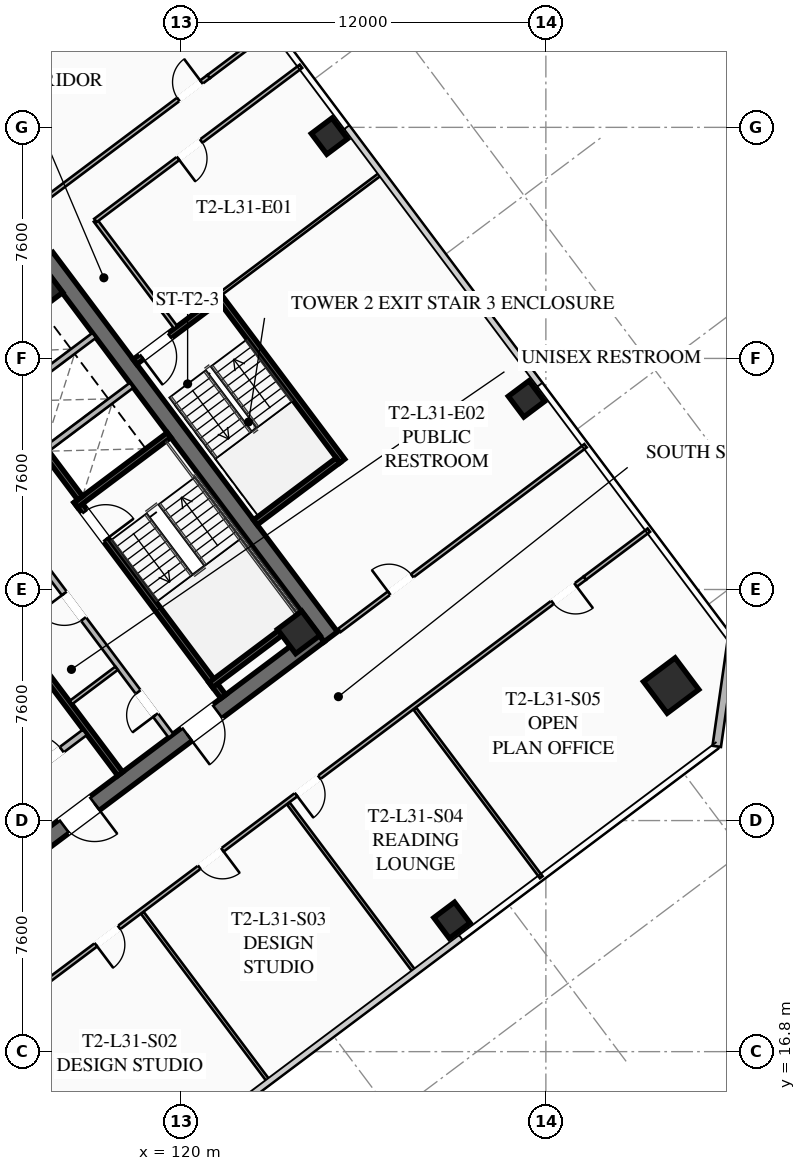
"""IFC4 building model, lengths in metres.
Left out: names, types, materials, properties, quantities, classifications, styles, units other than length and angle.
Written with IfcOpenShell. Run it as: python <this file> out.ifc"""

import sys

from ifc_helpers import new_model, si_unit, direction, frame, frame_2d, origin, origin_2d, place, context, subcontext, project, spatial, rectangle, hollow_rectangle, extrude, element, fill, save


model = new_model("IFC4")
c1 = context("Model", 3, precision=1e-05, world=origin(), true_north=direction((0.0, 1.0)))
c2 = subcontext(c1, "Body", "Model", "MODEL_VIEW")
j1 = project(units=[si_unit("LENGTHUNIT", "METRE"), si_unit("PLANEANGLEUNIT", "RADIAN")], contexts=[c1])
p1 = place(None, origin())
s1 = spatial("IfcSite", under=j1, at=p1, CompositionType="ELEMENT")
p2 = place(p1, origin())
s2 = spatial("IfcBuilding", under=s1, at=p2, CompositionType="ELEMENT")
p3 = place(p2, frame((0.0, 0.0, 117.95)))
s3 = spatial("IfcBuildingStorey", under=s2, at=p3, CompositionType="ELEMENT", Elevation=117.95)
p4 = place(p3, frame((115.564, 42.923, 0.0), z_axis=(0.0, 0.0, 1.0), x_axis=(0.600005007985, -0.799996243986, 0.0)))
e1 = element("IfcWall", 1, at=p4, inside=s3, PredefinedType="SHEAR", context=c2, shape_type="SweptSolid", body=[
    extrude(rectangle(XDim=15.6, YDim=0.55, at=frame_2d((7.8, 0.0))), origin(), (0.0, 0.0, 1.0), 3.55),
])
p5 = place(p3, frame((124.539, 30.498, 0.0), z_axis=(0.0, 0.0, 1.0), x_axis=(-0.799998054672, -0.600002593761, 0.0)))
e2 = element("IfcWall", 2, at=p5, inside=s3, PredefinedType="SHEAR", context=c2, shape_type="SweptSolid", body=[
    extrude(rectangle(XDim=15.06, YDim=0.55, at=frame_2d((7.53, 0.0))), origin(), (0.0, 0.0, 1.0), 3.55),
])
p6 = place(p5, frame((9.23, 0.0, 0.0)))
e3 = element("IfcOpeningElement", 3, at=p6, cuts=e2, PredefinedType="OPENING", context=c2, shape_type="SweptSolid", body=[
    extrude(rectangle(XDim=1.25, YDim=2.25, at=frame_2d((0.625, 1.125))), frame((0.0, 0.285, 0.0), z_axis=(0.0, -1.0, 0.0), x_axis=(1.0, 0.0, 0.0)), (0.0, 0.0, 1.0), 0.57),
])
p7 = place(p5, frame((4.18, 0.0, 0.0)))
e4 = element("IfcOpeningElement", 4, at=p7, cuts=e2, PredefinedType="OPENING", context=c2, shape_type="SweptSolid", body=[
    extrude(rectangle(XDim=1.25, YDim=2.25, at=frame_2d((0.625, 1.125))), frame((0.0, 0.285, 0.0), z_axis=(0.0, -1.0, 0.0), x_axis=(1.0, 0.0, 0.0)), (0.0, 0.0, 1.0), 0.57),
])
for number, where, z_axis, x_axis in (
    (5, (123.87, 30.59, 0.0), (0.0, 0.0, 1.0), (0.8, 0.6, 0.0)),
    (6, (115.41, 41.87, 0.0), (0.0, 0.0, 1.0), (0.8, 0.6, 0.0)),
):
    element("IfcColumn", number, at=place(p3, frame(where, z_axis=z_axis, x_axis=x_axis)), inside=s3, PredefinedType="COLUMN", context=c2, shape_type="SweptSolid", body=[
        extrude(hollow_rectangle(XDim=1.0, YDim=1.0, WallThickness=0.04, at=origin_2d()), origin(), (0.0, 0.0, 1.0), 3.37),
    ])
p8 = place(p3, frame((136.12, 28.84, 0.0), z_axis=(0.0, 0.0, 1.0), x_axis=(0.799999996291, 0.600000004945, 0.0)))
e7 = element("IfcColumn", 7, at=p8, inside=s3, PredefinedType="COLUMN", context=c2, shape_type="SweptSolid", body=[
    extrude(hollow_rectangle(XDim=1.3, YDim=1.3, WallThickness=0.05, at=origin_2d()), origin(), (0.0, 0.0, 1.0), 3.37),
])
for number, where, z_axis, x_axis in (
    (8, (128.91, 21.12, 0.0), (0.0, 0.0, 1.0), (0.8, 0.6, 0.0)),
    (9, (131.36, 38.27, 0.0), (0.0, 0.0, 1.0), (0.8, 0.6, 0.0)),
    (10, (124.88, 46.91, 0.0), (0.0, 0.0, 1.0), (0.8, 0.6, 0.0)),
):
    element("IfcColumn", number, at=place(p3, frame(where, z_axis=z_axis, x_axis=x_axis)), inside=s3, PredefinedType="COLUMN", context=c2, shape_type="SweptSolid", body=[
        extrude(hollow_rectangle(XDim=0.85, YDim=0.85, WallThickness=0.035, at=origin_2d()), origin(), (0.0, 0.0, 1.0), 3.37),
    ])
p9 = place(p3, frame((138.12, 30.34, 0.0), z_axis=(0.0, 0.0, 1.0), x_axis=(-0.141421356237, -0.989949493661, 0.0)))
e11 = element("IfcWall", 11, at=p9, inside=s3, PredefinedType="SOLIDWALL", context=c2, shape_type="SweptSolid", body=[
    extrude(rectangle(XDim=3.536, YDim=0.28, at=frame_2d((1.768, 0.0))), origin(), (0.0, 0.0, 1.0), 3.37),
])
p10 = place(p3, frame((116.56, 34.92, 0.0), z_axis=(0.0, 0.0, 1.0), x_axis=(0.59999029481, -0.8000072788, 0.0)))
e12 = element("IfcWall", 12, at=p10, inside=s3, PredefinedType="SHEAR", context=c2, shape_type="SweptSolid", body=[
    extrude(rectangle(XDim=8.05, YDim=0.2, at=frame_2d((4.025, 0.0))), origin(), (0.0, 0.0, 1.0), 3.37),
])
p11 = place(p10, frame((0.45, 0.0, 0.0)))
e13 = element("IfcOpeningElement", 13, at=p11, cuts=e12, PredefinedType="OPENING", context=c2, shape_type="SweptSolid", body=[
    extrude(rectangle(XDim=1.15, YDim=2.2, at=frame_2d((0.575, 1.1))), frame((0.0, 0.11, 0.0), z_axis=(0.0, -1.0, 0.0), x_axis=(1.0, 0.0, 0.0)), (0.0, 0.0, 1.0), 0.22),
])
for number, where, z_axis, x_axis in (
    (14, (116.54, 34.78, 0.0), (0.0, 0.0, 1.0), (0.8, 0.6, 0.0)),
    (15, (120.98, 28.86, 0.0), (0.0, 0.0, 1.0), (0.8, 0.6, 0.0)),
):
    element("IfcWall", number, at=place(p3, frame(where, z_axis=z_axis, x_axis=x_axis)), inside=s3, PredefinedType="SHEAR", context=c2, shape_type="SweptSolid", body=[
        extrude(rectangle(XDim=3.83, YDim=0.2, at=frame_2d((1.915, 0.0))), origin(), (0.0, 0.0, 1.0), 3.37),
    ])
p12 = place(p3, frame((117.998, 25.936, 0.0), z_axis=(0.0, 0.0, 1.0), x_axis=(-0.600002693989, 0.799997979501, 0.0)))
e16 = element("IfcWall", 16, at=p12, inside=s3, PredefinedType="SHEAR", context=c2, shape_type="SweptSolid", body=[
    extrude(rectangle(XDim=14.5, YDim=0.2, at=frame_2d((7.25, 0.0))), origin(), (0.0, 0.0, 1.0), 3.37),
])
p13 = place(p3, frame((114.316, 25.412, 0.0), z_axis=(0.0, 0.0, 1.0), x_axis=(0.800018601094, 0.59997519774, 0.0)))
e17 = element("IfcWall", 17, at=p13, inside=s3, PredefinedType="SOLIDWALL", context=c2, shape_type="SweptSolid", body=[
    extrude(rectangle(XDim=3.15, YDim=0.22, at=frame_2d((1.575, 0.0))), origin(), (0.0, 0.0, 1.0), 2.723),
])
p14 = place(p13, frame((0.95, 0.0, 0.0)))
e18 = element("IfcOpeningElement", 18, at=p14, cuts=e17, PredefinedType="OPENING", context=c2, shape_type="SweptSolid", body=[
    extrude(rectangle(XDim=1.25, YDim=2.25, at=frame_2d((0.625, 1.125))), frame((0.0, 0.12, 0.0), z_axis=(0.0, -1.0, 0.0), x_axis=(1.0, 0.0, 0.0)), (0.0, 0.0, 1.0), 0.24),
])
p15 = place(p3, frame((112.81, 40.17, 0.0), z_axis=(0.0, 0.0, 1.0), x_axis=(0.599993943644, -0.800004542231, 0.0)))
e19 = element("IfcWall", 19, at=p15, inside=s3, PredefinedType="SHEAR", context=c2, shape_type="SweptSolid", body=[
    extrude(rectangle(XDim=6.45, YDim=0.2, at=frame_2d((3.225, 0.0))), origin(), (0.0, 0.0, 1.0), 3.37),
])
for number, where, z_axis, x_axis in (
    (20, (115.59, 36.63, 0.0), (0.0, 0.0, 1.0), (0.8, 0.6, 0.0)),
    (21, (114.36, 38.27, 0.0), (0.0, 0.0, 1.0), (0.8, 0.6, 0.0)),
):
    element("IfcWall", number, at=place(p3, frame(where, z_axis=z_axis, x_axis=x_axis)), inside=s3, PredefinedType="SOLIDWALL", context=c2, shape_type="SweptSolid", body=[
        extrude(rectangle(XDim=3.48, YDim=0.2, at=frame_2d((1.74, 0.0))), origin(), (0.0, 0.0, 1.0), 3.37),
    ])
p16 = place(p3, frame((119.67, 27.19, 0.0), z_axis=(0.0, 0.0, 1.0), x_axis=(-0.599988677396, 0.800008491828, 0.0)))
e22 = element("IfcWall", 22, at=p16, inside=s3, PredefinedType="SOLIDWALL", context=c2, shape_type="SweptSolid", body=[
    extrude(rectangle(XDim=6.9, YDim=0.2, at=frame_2d((3.45, 0.0))), origin(), (0.0, 0.0, 1.0), 2.723),
])
p17 = place(p16, frame((0.85, 0.0, 0.0)))
e23 = element("IfcOpeningElement", 23, at=p17, cuts=e22, PredefinedType="OPENING", context=c2, shape_type="SweptSolid", body=[
    extrude(rectangle(XDim=0.95, YDim=2.05, at=frame_2d((0.475, 1.025))), frame((0.0, 0.11, 0.0), z_axis=(0.0, -1.0, 0.0), x_axis=(1.0, 0.0, 0.0)), (0.0, 0.0, 1.0), 0.22),
])
p18 = place(p16, frame((4.8, 0.0, 0.0)))
e24 = element("IfcOpeningElement", 24, at=p18, cuts=e22, PredefinedType="OPENING", context=c2, shape_type="SweptSolid", body=[
    extrude(rectangle(XDim=1.05, YDim=2.2, at=frame_2d((0.525, 1.1))), frame((0.0, 0.11, 0.0), z_axis=(0.0, -1.0, 0.0), x_axis=(1.0, 0.0, 0.0)), (0.0, 0.0, 1.0), 0.22),
])
p19 = place(p3, frame((116.376, 28.282, 0.0), z_axis=(0.0, 0.0, 1.0), x_axis=(0.8, 0.6, 0.0)))
e25 = element("IfcWall", 25, at=p19, inside=s3, PredefinedType="PARTITIONING", context=c2, shape_type="SweptSolid", body=[
    extrude(rectangle(XDim=1.88, YDim=0.135, at=frame_2d((0.94, 0.0))), origin(), (0.0, 0.0, 1.0), 2.723),
])
p20 = place(p3, frame((125.304, 36.228, 0.0), z_axis=(0.0, 0.0, 1.0), x_axis=(-0.59998851072, 0.800008616831, 0.0)))
e26 = element("IfcWall", 26, at=p20, inside=s3, PredefinedType="SHEAR", context=c2, shape_type="SweptSolid", body=[
    extrude(rectangle(XDim=6.8, YDim=0.2, at=frame_2d((3.4, 0.0))), origin(), (0.0, 0.0, 1.0), 3.37),
])
p21 = place(p3, frame((121.204, 41.528, 0.0), z_axis=(0.0, 0.0, 1.0), x_axis=(-0.800017232136, -0.599977023131, 0.0)))
e27 = element("IfcWall", 27, at=p21, inside=s3, PredefinedType="SHEAR", context=c2, shape_type="SweptSolid", body=[
    extrude(rectangle(XDim=3.4, YDim=0.2, at=frame_2d((1.7, 0.0))), origin(), (0.0, 0.0, 1.0), 3.37),
])
p22 = place(p21, frame((1.975, 0.0, 0.0)))
e28 = element("IfcOpeningElement", 28, at=p22, cuts=e27, PredefinedType="OPENING", context=c2, shape_type="SweptSolid", body=[
    extrude(rectangle(XDim=1.15, YDim=2.2, at=frame_2d((0.575, 1.1))), frame((0.0, 0.11, 0.0), z_axis=(0.0, -1.0, 0.0), x_axis=(1.0, 0.0, 0.0)), (0.0, 0.0, 1.0), 0.22),
])
p23 = place(p3, frame((122.444, 34.208, 0.0), z_axis=(0.0, 0.0, 1.0), x_axis=(0.79999138319, 0.600011488909, 0.0)))
e29 = element("IfcWall", 29, at=p23, inside=s3, PredefinedType="SHEAR", context=c2, shape_type="SweptSolid", body=[
    extrude(rectangle(XDim=3.4, YDim=0.2, at=frame_2d((1.7, 0.0))), origin(), (0.0, 0.0, 1.0), 3.37),
])
p24 = place(p3, frame((119.824, 40.618, 0.0), z_axis=(0.0, 0.0, 1.0), x_axis=(-0.599982243973, 0.800013316712, 0.0)))
e30 = element("IfcWall", 30, at=p24, inside=s3, PredefinedType="PARTITIONING", context=c2, shape_type="SweptSolid", body=[
    extrude(rectangle(XDim=4.4, YDim=0.135, at=frame_2d((2.2, 0.0))), origin(), (0.0, 0.0, 1.0), 2.723),
])
p25 = place(p3, frame((95.87, 30.09, 0.0), z_axis=(0.0, 0.0, 1.0), x_axis=(0.799997191971, 0.600003744021, 0.0)))
e31 = element("IfcWall", 31, at=p25, inside=s3, PredefinedType="PARTITIONING", context=c2, shape_type="SweptSolid", body=[
    extrude(rectangle(XDim=31.3, YDim=0.135, at=frame_2d((15.65, 0.0))), origin(), (0.0, 0.0, 1.0), 2.723),
])
p26 = place(p25, frame((0.3, 0.0, 0.0)))
e32 = element("IfcOpeningElement", 32, at=p26, cuts=e31, PredefinedType="OPENING", context=c2, shape_type="SweptSolid", body=[
    extrude(rectangle(XDim=0.95, YDim=2.05, at=frame_2d((0.475, 1.025))), frame((0.0, 0.077, 0.0), z_axis=(0.0, -1.0, 0.0), x_axis=(1.0, 0.0, 0.0)), (0.0, 0.0, 1.0), 0.155),
])
p27 = place(p25, frame((30.05, 0.0, 0.0)))
e33 = element("IfcOpeningElement", 33, at=p27, cuts=e31, PredefinedType="OPENING", context=c2, shape_type="SweptSolid", body=[
    extrude(rectangle(XDim=0.95, YDim=2.05, at=frame_2d((0.475, 1.025))), frame((0.0, 0.077, 0.0), z_axis=(0.0, -1.0, 0.0), x_axis=(1.0, 0.0, 0.0)), (0.0, 0.0, 1.0), 0.155),
])
p28 = place(p3, frame((120.91, 48.87, 0.0), z_axis=(0.0, 0.0, 1.0), x_axis=(0.80002227902, 0.599970293491, 0.0)))
e34 = element("IfcWall", 34, at=p28, inside=s3, PredefinedType="PARTITIONING", context=c2, shape_type="SweptSolid", body=[
    extrude(rectangle(XDim=2.63, YDim=0.135, at=frame_2d((1.315, 0.0))), origin(), (0.0, 0.0, 1.0), 2.723),
])
p29 = place(p3, frame((133.282, 32.374, 0.0), z_axis=(0.0, 0.0, 1.0), x_axis=(-0.8, -0.6, 0.0)))
e35 = element("IfcWall", 35, at=p29, inside=s3, PredefinedType="PARTITIONING", context=c2, shape_type="SweptSolid", body=[
    extrude(rectangle(XDim=31.3, YDim=0.135, at=frame_2d((15.65, 0.0))), origin(), (0.0, 0.0, 1.0), 2.723),
])
p30 = place(p29, frame((29.97, 0.0, 0.0)))
e36 = element("IfcOpeningElement", 36, at=p30, cuts=e35, PredefinedType="OPENING", context=c2, shape_type="SweptSolid", body=[
    extrude(rectangle(XDim=0.95, YDim=2.05, at=frame_2d((0.475, 1.025))), frame((0.0, 0.077, 0.0), z_axis=(0.0, -1.0, 0.0), x_axis=(1.0, 0.0, 0.0)), (0.0, 0.0, 1.0), 0.155),
])
p31 = place(p29, frame((19.151, 0.0, 0.0)))
e37 = element("IfcOpeningElement", 37, at=p31, cuts=e35, PredefinedType="OPENING", context=c2, shape_type="SweptSolid", body=[
    extrude(rectangle(XDim=0.95, YDim=2.05, at=frame_2d((0.475, 1.025))), frame((0.0, 0.077, 0.0), z_axis=(0.0, -1.0, 0.0), x_axis=(1.0, 0.0, 0.0)), (0.0, 0.0, 1.0), 0.155),
])
p32 = place(p29, frame((14.901, 0.0, 0.0)))
e38 = element("IfcOpeningElement", 38, at=p32, cuts=e35, PredefinedType="OPENING", context=c2, shape_type="SweptSolid", body=[
    extrude(rectangle(XDim=0.95, YDim=2.05, at=frame_2d((0.475, 1.025))), frame((0.0, 0.077, 0.0), z_axis=(0.0, -1.0, 0.0), x_axis=(1.0, 0.0, 0.0)), (0.0, 0.0, 1.0), 0.155),
])
p33 = place(p29, frame((10.92, 0.0, 0.0)))
e39 = element("IfcOpeningElement", 39, at=p33, cuts=e35, PredefinedType="OPENING", context=c2, shape_type="SweptSolid", body=[
    extrude(rectangle(XDim=0.95, YDim=2.05, at=frame_2d((0.475, 1.025))), frame((0.0, 0.077, 0.0), z_axis=(0.0, -1.0, 0.0), x_axis=(1.0, 0.0, 0.0)), (0.0, 0.0, 1.0), 0.155),
])
p34 = place(p29, frame((0.38, 0.0, 0.0)))
e40 = element("IfcOpeningElement", 40, at=p34, cuts=e35, PredefinedType="OPENING", context=c2, shape_type="SweptSolid", body=[
    extrude(rectangle(XDim=0.95, YDim=2.05, at=frame_2d((0.475, 1.025))), frame((0.0, 0.077, 0.0), z_axis=(0.0, -1.0, 0.0), x_axis=(1.0, 0.0, 0.0)), (0.0, 0.0, 1.0), 0.155),
])
p35 = place(p3, frame((133.282, 32.374, 0.0), z_axis=(0.0, 0.0, 1.0), x_axis=(0.80002227902, 0.599970293491, 0.0)))
e41 = element("IfcWall", 41, at=p35, inside=s3, PredefinedType="PARTITIONING", context=c2, shape_type="SweptSolid", body=[
    extrude(rectangle(XDim=2.63, YDim=0.135, at=frame_2d((1.315, 0.0))), origin(), (0.0, 0.0, 1.0), 2.723),
])
p36 = place(p3, frame((117.768, 11.976, 0.0), z_axis=(0.0, 0.0, 1.0), x_axis=(-0.6, 0.8, 0.0)))
e42 = element("IfcWall", 42, at=p36, inside=s3, PredefinedType="PARTITIONING", context=c2, shape_type="SweptSolid", body=[
    extrude(rectangle(XDim=6.93, YDim=0.11, at=frame_2d((3.465, 0.0))), origin(), (0.0, 0.0, 1.0), 2.723),
])
p37 = place(p3, frame((122.888, 15.816, 0.0), z_axis=(0.0, 0.0, 1.0), x_axis=(-0.599983090003, 0.800012682219, 0.0)))
e43 = element("IfcWall", 43, at=p37, inside=s3, PredefinedType="PARTITIONING", context=c2, shape_type="SweptSolid", body=[
    extrude(rectangle(XDim=6.93, YDim=0.11, at=frame_2d((3.465, 0.0))), origin(), (0.0, 0.0, 1.0), 2.723),
])
p38 = place(p3, frame((127.688, 19.416, 0.0), z_axis=(0.0, 0.0, 1.0), x_axis=(-0.6, 0.8, 0.0)))
e44 = element("IfcWall", 44, at=p38, inside=s3, PredefinedType="PARTITIONING", context=c2, shape_type="SweptSolid", body=[
    extrude(rectangle(XDim=6.93, YDim=0.11, at=frame_2d((3.465, 0.0))), origin(), (0.0, 0.0, 1.0), 2.723),
])
p39 = place(p3, frame((131.848, 22.536, 0.0), z_axis=(0.0, 0.0, 1.0), x_axis=(-0.599983090003, 0.800012682219, 0.0)))
e45 = element("IfcWall", 45, at=p39, inside=s3, PredefinedType="PARTITIONING", context=c2, shape_type="SweptSolid", body=[
    extrude(rectangle(XDim=6.93, YDim=0.11, at=frame_2d((3.465, 0.0))), origin(), (0.0, 0.0, 1.0), 2.723),
])
p40 = place(p3, frame((123.944, 49.208, 0.0), z_axis=(0.0, 0.0, 1.0), x_axis=(-0.799996532921, -0.600004622744, 0.0)))
e46 = element("IfcWall", 46, at=p40, inside=s3, PredefinedType="PARTITIONING", context=c2, shape_type="SweptSolid", body=[
    extrude(rectangle(XDim=8.45, YDim=0.135, at=frame_2d((4.225, 0.0))), origin(), (0.0, 0.0, 1.0), 2.723),
])
p41 = place(p40, frame((4.1, 0.0, 0.0)))
e47 = element("IfcOpeningElement", 47, at=p41, cuts=e46, PredefinedType="OPENING", context=c2, shape_type="SweptSolid", body=[
    extrude(rectangle(XDim=0.95, YDim=2.05, at=frame_2d((0.475, 1.025))), frame((0.0, 0.077, 0.0), z_axis=(0.0, -1.0, 0.0), x_axis=(1.0, 0.0, 0.0)), (0.0, 0.0, 1.0), 0.155),
])
p42 = place(p3, frame((125.208, 30.656, 0.0), z_axis=(0.0, 0.0, 1.0), x_axis=(0.799997105034, 0.600003859935, 0.0)))
e48 = element("IfcWall", 48, at=p42, inside=s3, PredefinedType="PARTITIONING", context=c2, shape_type="SweptSolid", body=[
    extrude(rectangle(XDim=10.12, YDim=0.135, at=frame_2d((5.06, 0.0))), origin(), (0.0, 0.0, 1.0), 2.723),
])
p43 = place(p42, frame((2.045, 0.0, 0.0)))
e49 = element("IfcOpeningElement", 49, at=p43, cuts=e48, PredefinedType="OPENING", context=c2, shape_type="SweptSolid", body=[
    extrude(rectangle(XDim=0.95, YDim=2.05, at=frame_2d((0.475, 1.025))), frame((0.0, 0.077, 0.0), z_axis=(0.0, -1.0, 0.0), x_axis=(1.0, 0.0, 0.0)), (0.0, 0.0, 1.0), 0.155),
])
p44 = place(p3, frame((126.584, 45.688, 0.0), z_axis=(0.0, 0.0, 1.0), x_axis=(-0.800004438899, -0.599994081423, 0.0)))
e50 = element("IfcWall", 50, at=p44, inside=s3, PredefinedType="PARTITIONING", context=c2, shape_type="SweptSolid", body=[
    extrude(rectangle(XDim=6.6, YDim=0.11, at=frame_2d((3.3, 0.0))), origin(), (0.0, 0.0, 1.0), 2.723),
])
p45 = place(p6, origin())
e51 = element("IfcDoor", 51, at=p45, inside=s3, OperationType="SINGLE_SWING_LEFT", PredefinedType="DOOR", context=c2, shape_type="SweptSolid", body=[
    extrude(rectangle(XDim=1.25, YDim=2.25, at=frame_2d((0.625, 1.125))), frame((0.0, 0.025, 0.0), z_axis=(0.0, -1.0, 0.0), x_axis=(1.0, 0.0, 0.0)), (0.0, 0.0, 1.0), 0.05),
])
fill(e3, e51)
p46 = place(p7, origin())
e52 = element("IfcDoor", 52, at=p46, inside=s3, OperationType="SINGLE_SWING_RIGHT", PredefinedType="DOOR", context=c2, shape_type="SweptSolid", body=[
    extrude(rectangle(XDim=1.25, YDim=2.25, at=frame_2d((0.625, 1.125))), frame((0.0, 0.025, 0.0), z_axis=(0.0, -1.0, 0.0), x_axis=(1.0, 0.0, 0.0)), (0.0, 0.0, 1.0), 0.05),
])
fill(e4, e52)
p47 = place(p11, origin())
e53 = element("IfcDoor", 53, at=p47, inside=s3, OperationType="SINGLE_SWING_RIGHT", PredefinedType="DOOR", context=c2, shape_type="SweptSolid", body=[
    extrude(rectangle(XDim=1.15, YDim=2.2, at=frame_2d((0.575, 1.1))), frame((0.0, 0.025, 0.0), z_axis=(0.0, -1.0, 0.0), x_axis=(1.0, 0.0, 0.0)), (0.0, 0.0, 1.0), 0.05),
])
fill(e13, e53)
p48 = place(p14, origin())
e54 = element("IfcDoor", 54, at=p48, inside=s3, OperationType="SINGLE_SWING_LEFT", PredefinedType="DOOR", context=c2, shape_type="SweptSolid", body=[
    extrude(rectangle(XDim=1.25, YDim=2.25, at=frame_2d((0.625, 1.125))), frame((0.0, 0.025, 0.0), z_axis=(0.0, -1.0, 0.0), x_axis=(1.0, 0.0, 0.0)), (0.0, 0.0, 1.0), 0.05),
])
fill(e18, e54)
p49 = place(p17, origin())
e55 = element("IfcDoor", 55, at=p49, inside=s3, OperationType="SINGLE_SWING_LEFT", PredefinedType="DOOR", context=c2, shape_type="SweptSolid", body=[
    extrude(rectangle(XDim=0.95, YDim=2.05, at=frame_2d((0.475, 1.025))), frame((0.0, 0.025, 0.0), z_axis=(0.0, -1.0, 0.0), x_axis=(1.0, 0.0, 0.0)), (0.0, 0.0, 1.0), 0.05),
])
fill(e23, e55)
p50 = place(p18, origin())
e56 = element("IfcDoor", 56, at=p50, inside=s3, OperationType="SINGLE_SWING_RIGHT", PredefinedType="DOOR", context=c2, shape_type="SweptSolid", body=[
    extrude(rectangle(XDim=1.05, YDim=2.2, at=frame_2d((0.525, 1.1))), frame((0.0, 0.025, 0.0), z_axis=(0.0, -1.0, 0.0), x_axis=(1.0, 0.0, 0.0)), (0.0, 0.0, 1.0), 0.05),
])
fill(e24, e56)
p51 = place(p22, origin())
e57 = element("IfcDoor", 57, at=p51, inside=s3, OperationType="SINGLE_SWING_RIGHT", PredefinedType="DOOR", context=c2, shape_type="SweptSolid", body=[
    extrude(rectangle(XDim=1.15, YDim=2.2, at=frame_2d((0.575, 1.1))), frame((0.0, 0.025, 0.0), z_axis=(0.0, -1.0, 0.0), x_axis=(1.0, 0.0, 0.0)), (0.0, 0.0, 1.0), 0.05),
])
fill(e28, e57)
p52 = place(p27, origin())
e58 = element("IfcDoor", 58, at=p52, inside=s3, OperationType="SINGLE_SWING_RIGHT", PredefinedType="DOOR", context=c2, shape_type="SweptSolid", body=[
    extrude(rectangle(XDim=0.95, YDim=2.05, at=frame_2d((0.475, 1.025))), frame((0.0, 0.025, 0.0), z_axis=(0.0, -1.0, 0.0), x_axis=(1.0, 0.0, 0.0)), (0.0, 0.0, 1.0), 0.05),
])
fill(e33, e58)
p53 = place(p31, origin())
e59 = element("IfcDoor", 59, at=p53, inside=s3, OperationType="SINGLE_SWING_RIGHT", PredefinedType="DOOR", context=c2, shape_type="SweptSolid", body=[
    extrude(rectangle(XDim=0.95, YDim=2.05, at=frame_2d((0.475, 1.025))), frame((0.0, 0.025, 0.0), z_axis=(0.0, -1.0, 0.0), x_axis=(1.0, 0.0, 0.0)), (0.0, 0.0, 1.0), 0.05),
])
fill(e37, e59)
p54 = place(p32, origin())
e60 = element("IfcDoor", 60, at=p54, inside=s3, OperationType="SINGLE_SWING_LEFT", PredefinedType="DOOR", context=c2, shape_type="SweptSolid", body=[
    extrude(rectangle(XDim=0.95, YDim=2.05, at=frame_2d((0.475, 1.025))), frame((0.0, 0.025, 0.0), z_axis=(0.0, -1.0, 0.0), x_axis=(1.0, 0.0, 0.0)), (0.0, 0.0, 1.0), 0.05),
])
fill(e38, e60)
p55 = place(p33, origin())
e61 = element("IfcDoor", 61, at=p55, inside=s3, OperationType="SINGLE_SWING_RIGHT", PredefinedType="DOOR", context=c2, shape_type="SweptSolid", body=[
    extrude(rectangle(XDim=0.95, YDim=2.05, at=frame_2d((0.475, 1.025))), frame((0.0, 0.025, 0.0), z_axis=(0.0, -1.0, 0.0), x_axis=(1.0, 0.0, 0.0)), (0.0, 0.0, 1.0), 0.05),
])
fill(e39, e61)
p56 = place(p34, origin())
e62 = element("IfcDoor", 62, at=p56, inside=s3, OperationType="SINGLE_SWING_LEFT", PredefinedType="DOOR", context=c2, shape_type="SweptSolid", body=[
    extrude(rectangle(XDim=0.95, YDim=2.05, at=frame_2d((0.475, 1.025))), frame((0.0, 0.025, 0.0), z_axis=(0.0, -1.0, 0.0), x_axis=(1.0, 0.0, 0.0)), (0.0, 0.0, 1.0), 0.05),
])
fill(e40, e62)
p57 = place(p41, origin())
e63 = element("IfcDoor", 63, at=p57, inside=s3, OperationType="SINGLE_SWING_RIGHT", PredefinedType="DOOR", context=c2, shape_type="SweptSolid", body=[
    extrude(rectangle(XDim=0.95, YDim=2.05, at=frame_2d((0.475, 1.025))), frame((0.0, 0.025, 0.0), z_axis=(0.0, -1.0, 0.0), x_axis=(1.0, 0.0, 0.0)), (0.0, 0.0, 1.0), 0.05),
])
fill(e47, e63)
p58 = place(p43, origin())
e64 = element("IfcDoor", 64, at=p58, inside=s3, OperationType="SINGLE_SWING_LEFT", PredefinedType="DOOR", context=c2, shape_type="SweptSolid", body=[
    extrude(rectangle(XDim=0.95, YDim=2.05, at=frame_2d((0.475, 1.025))), frame((0.0, 0.025, 0.0), z_axis=(0.0, -1.0, 0.0), x_axis=(1.0, 0.0, 0.0)), (0.0, 0.0, 1.0), 0.05),
])
fill(e49, e64)
save(model, sys.argv[1])
